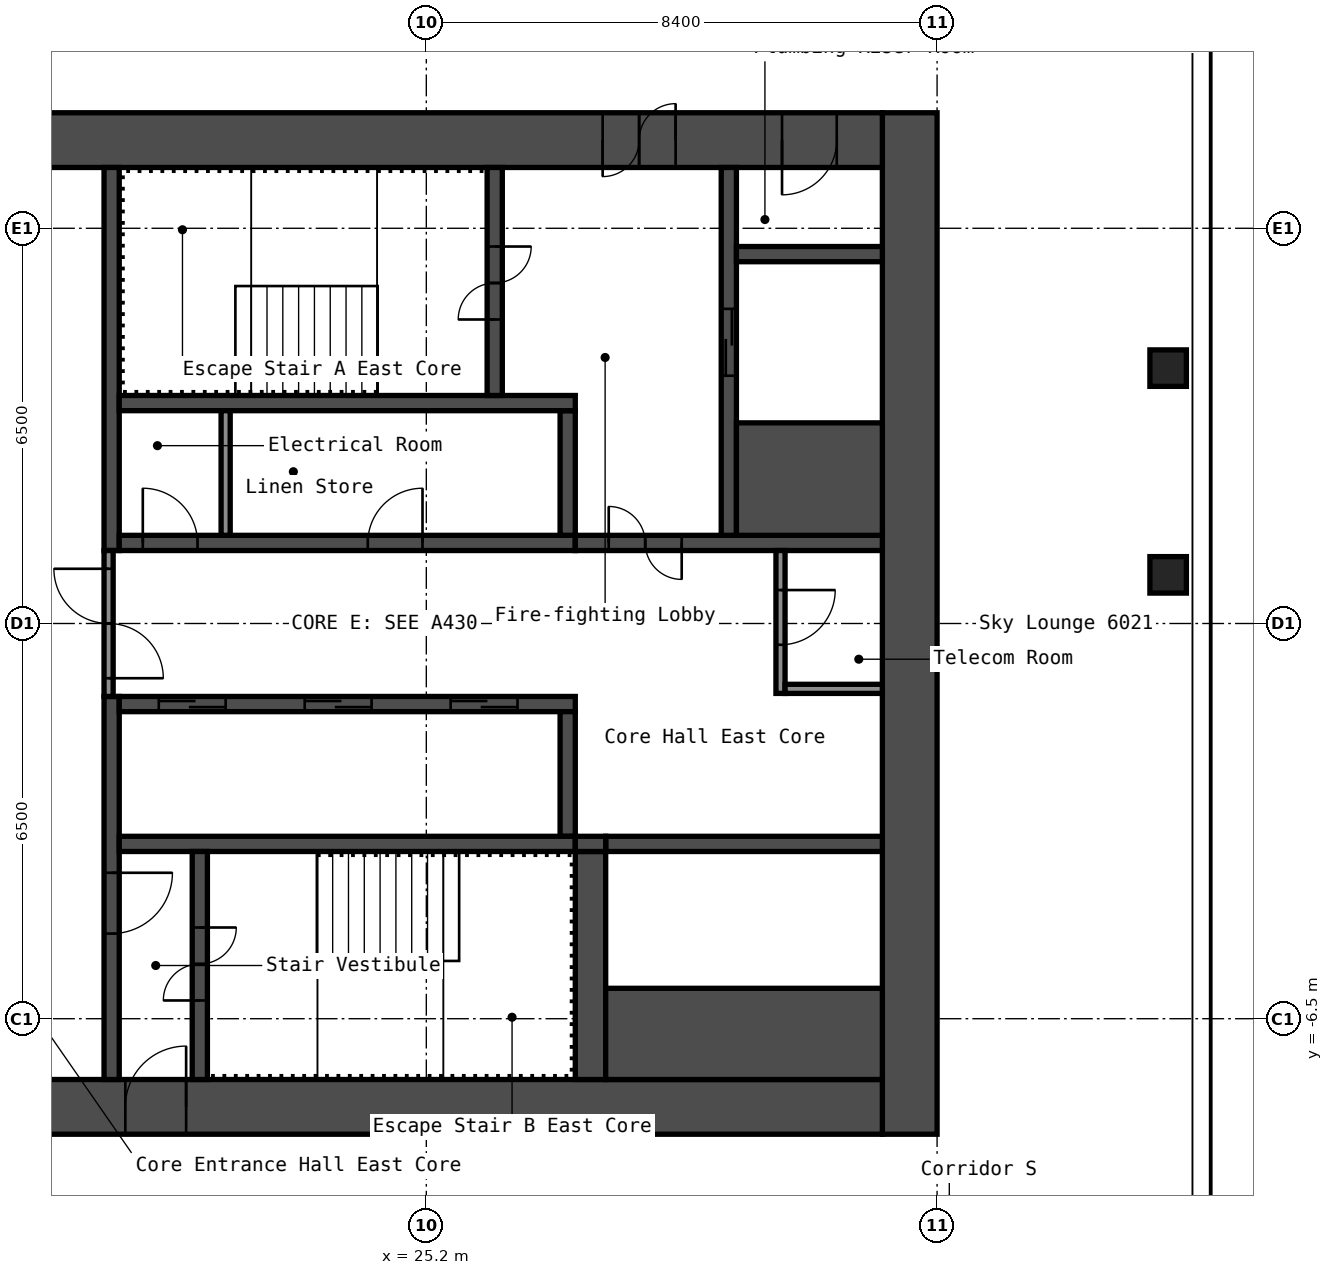
"""IFC4 building model, lengths in metres.
Left out: names, types, materials, properties, quantities, classifications, styles, units other than length and angle.
Written with IfcOpenShell. Run it as: python <this file> out.ifc"""

import sys

from ifc_helpers import new_model, si_unit, direction, frame, frame_2d, origin, origin_2d, place, context, subcontext, project, spatial, rectangle, hollow_rectangle, extrude, element, fill, save


model = new_model("IFC4")
c1 = context("Model", 3, precision=1e-05, world=origin(), true_north=direction((0.0, 1.0)))
c2 = subcontext(c1, "Body", "Model", "MODEL_VIEW")
j1 = project(units=[si_unit("LENGTHUNIT", "METRE"), si_unit("PLANEANGLEUNIT", "RADIAN")], contexts=[c1])
p1 = place(None, origin())
s1 = spatial("IfcSite", under=j1, at=p1, CompositionType="ELEMENT")
p2 = place(p1, origin())
s2 = spatial("IfcBuilding", under=s1, at=p2, CompositionType="ELEMENT")
p3 = place(p2, frame((0.0, 0.0, 212.2)))
s3 = spatial("IfcBuildingStorey", under=s2, at=p3, CompositionType="ELEMENT", Elevation=212.2)
for number, where, z_axis, x_axis in (
    (1, (37.4, 0.8, 0.0), (0.0, 0.0, 1.0), (1.0, 0.0, 0.0)),
    (2, (37.4, 4.2, 0.0), (0.0, 0.0, 1.0), (1.0, 0.0, 0.0)),
):
    element("IfcColumn", number, at=place(p3, frame(where, z_axis=z_axis, x_axis=x_axis)), inside=s3, PredefinedType="COLUMN", context=c2, shape_type="SweptSolid", body=[
        extrude(hollow_rectangle(XDim=0.6, YDim=0.6, WallThickness=0.025, InnerFilletRadius=0.038, OuterFilletRadius=0.062, at=origin_2d()), origin(), (0.0, 0.0, 1.0), 2.75),
    ])
p4 = place(p3, frame((33.15, -8.4, 0.0), z_axis=(0.0, 0.0, 1.0), x_axis=(0.0, 1.0, 0.0)))
e3 = element("IfcWall", 3, at=p4, inside=s3, PredefinedType="SHEAR", context=c2, shape_type="SweptSolid", body=[
    extrude(rectangle(XDim=16.8, YDim=0.9, at=frame_2d((8.4, 0.0))), origin(), (0.0, 0.0, 1.0), 2.75),
])
p5 = place(p3, frame((17.7, 7.95, 0.0), z_axis=(0.0, 0.0, 1.0), x_axis=(1.0, 0.0, 0.0)))
e4 = element("IfcWall", 4, at=p5, inside=s3, PredefinedType="SHEAR", context=c2, shape_type="SweptSolid", body=[
    extrude(rectangle(XDim=15.0, YDim=0.9, at=frame_2d((7.5, 0.0))), origin(), (0.0, 0.0, 1.0), 2.75),
])
p6 = place(p5, frame((10.4, 0.0, 0.0)))
e5 = element("IfcOpeningElement", 5, at=p6, cuts=e4, PredefinedType="OPENING", context=c2, shape_type="SweptSolid", body=[
    extrude(rectangle(XDim=1.2, YDim=2.1, at=frame_2d((0.6, 1.05))), frame((0.0, 0.46, 0.0), z_axis=(0.0, -1.0, 0.0), x_axis=(1.0, 0.0, 0.0)), (0.0, 0.0, 1.0), 0.92),
])
p7 = place(p5, frame((13.35, 0.0, 0.0)))
e6 = element("IfcOpeningElement", 6, at=p7, cuts=e4, PredefinedType="OPENING", context=c2, shape_type="SweptSolid", body=[
    extrude(rectangle(XDim=0.9, YDim=2.1, at=frame_2d((0.45, 1.05))), frame((0.0, 0.46, 0.0), z_axis=(0.0, -1.0, 0.0), x_axis=(1.0, 0.0, 0.0)), (0.0, 0.0, 1.0), 0.92),
])
p8 = place(p3, frame((17.7, -7.95, 0.0), z_axis=(0.0, 0.0, 1.0), x_axis=(1.0, 0.0, 0.0)))
e7 = element("IfcWall", 7, at=p8, inside=s3, PredefinedType="SHEAR", context=c2, shape_type="SweptSolid", body=[
    extrude(rectangle(XDim=15.0, YDim=0.9, at=frame_2d((7.5, 0.0))), origin(), (0.0, 0.0, 1.0), 2.75),
])
p9 = place(p8, frame((2.55, 0.0, 0.0)))
e8 = element("IfcOpeningElement", 8, at=p9, cuts=e7, PredefinedType="OPENING", context=c2, shape_type="SweptSolid", body=[
    extrude(rectangle(XDim=1.0, YDim=2.1, at=frame_2d((0.5, 1.05))), frame((0.0, 0.46, 0.0), z_axis=(0.0, -1.0, 0.0), x_axis=(1.0, 0.0, 0.0)), (0.0, 0.0, 1.0), 0.92),
])
p10 = place(p3, frame((20.025, 1.2, 0.0), z_axis=(0.0, 0.0, 1.0), x_axis=(0.0, 1.0, 0.0)))
e9 = element("IfcWall", 9, at=p10, inside=s3, PredefinedType="SHEAR", context=c2, shape_type="SweptSolid", body=[
    extrude(rectangle(XDim=6.3, YDim=0.25, at=frame_2d((3.15, 0.0))), origin(), (0.0, 0.0, 1.0), 2.75),
])
p11 = place(p3, frame((20.025, -7.5, 0.0), z_axis=(0.0, 0.0, 1.0), x_axis=(0.0, 1.0, 0.0)))
e10 = element("IfcWall", 10, at=p11, inside=s3, PredefinedType="SHEAR", context=c2, shape_type="SweptSolid", body=[
    extrude(rectangle(XDim=6.3, YDim=0.25, at=frame_2d((3.15, 0.0))), origin(), (0.0, 0.0, 1.0), 2.75),
])
p12 = place(p11, frame((2.4, 0.0, 0.0)))
e11 = element("IfcOpeningElement", 11, at=p12, cuts=e10, PredefinedType="OPENING", context=c2, shape_type="SweptSolid", body=[
    extrude(rectangle(XDim=1.0, YDim=2.1, at=frame_2d((0.5, 1.05))), frame((0.0, 0.135, 0.0), z_axis=(0.0, -1.0, 0.0), x_axis=(1.0, 0.0, 0.0)), (0.0, 0.0, 1.0), 0.27),
])
p13 = place(p3, frame((20.15, 1.325, 0.0), z_axis=(0.0, 0.0, 1.0), x_axis=(1.0, 0.0, 0.0)))
e12 = element("IfcWall", 12, at=p13, inside=s3, PredefinedType="SHEAR", context=c2, shape_type="SweptSolid", body=[
    extrude(rectangle(XDim=7.5, YDim=0.25, at=frame_2d((3.75, 0.0))), origin(), (0.0, 0.0, 1.0), 2.75),
])
p14 = place(p13, frame((0.387, 0.0, 0.0)))
e13 = element("IfcOpeningElement", 13, at=p14, cuts=e12, PredefinedType="OPENING", context=c2, shape_type="SweptSolid", body=[
    extrude(rectangle(XDim=0.9, YDim=2.1, at=frame_2d((0.45, 1.05))), frame((0.0, 0.135, 0.0), z_axis=(0.0, -1.0, 0.0), x_axis=(1.0, 0.0, 0.0)), (0.0, 0.0, 1.0), 0.27),
])
p15 = place(p13, frame((4.087, 0.0, 0.0)))
e14 = element("IfcOpeningElement", 14, at=p15, cuts=e12, PredefinedType="OPENING", context=c2, shape_type="SweptSolid", body=[
    extrude(rectangle(XDim=0.9, YDim=2.1, at=frame_2d((0.45, 1.05))), frame((0.0, 0.135, 0.0), z_axis=(0.0, -1.0, 0.0), x_axis=(1.0, 0.0, 0.0)), (0.0, 0.0, 1.0), 0.27),
])
p16 = place(p3, frame((27.525, 1.45, 0.0), z_axis=(0.0, 0.0, 1.0), x_axis=(0.0, 1.0, 0.0)))
e15 = element("IfcWall", 15, at=p16, inside=s3, PredefinedType="SHEAR", context=c2, shape_type="SweptSolid", body=[
    extrude(rectangle(XDim=2.05, YDim=0.25, at=frame_2d((1.025, 0.0))), origin(), (0.0, 0.0, 1.0), 2.75),
])
p17 = place(p3, frame((20.15, 3.625, 0.0), z_axis=(0.0, 0.0, 1.0), x_axis=(1.0, 0.0, 0.0)))
e16 = element("IfcWall", 16, at=p17, inside=s3, PredefinedType="SHEAR", context=c2, shape_type="SweptSolid", body=[
    extrude(rectangle(XDim=7.5, YDim=0.25, at=frame_2d((3.75, 0.0))), origin(), (0.0, 0.0, 1.0), 2.75),
])
p18 = place(p3, frame((26.325, 3.75, 0.0), z_axis=(0.0, 0.0, 1.0), x_axis=(0.0, 1.0, 0.0)))
e17 = element("IfcWall", 17, at=p18, inside=s3, PredefinedType="SHEAR", context=c2, shape_type="SweptSolid", body=[
    extrude(rectangle(XDim=3.75, YDim=0.25, at=frame_2d((1.875, 0.0))), origin(), (0.0, 0.0, 1.0), 2.75),
])
p19 = place(p18, frame((1.25, 0.0, 0.0)))
e18 = element("IfcOpeningElement", 18, at=p19, cuts=e17, PredefinedType="OPENING", context=c2, shape_type="SweptSolid", body=[
    extrude(rectangle(XDim=1.2, YDim=2.1, at=frame_2d((0.6, 1.05))), frame((0.0, 0.135, 0.0), z_axis=(0.0, -1.0, 0.0), x_axis=(1.0, 0.0, 0.0)), (0.0, 0.0, 1.0), 0.27),
])
p20 = place(p3, frame((27.65, 1.325, 0.0), z_axis=(0.0, 0.0, 1.0), x_axis=(1.0, 0.0, 0.0)))
e19 = element("IfcWall", 19, at=p20, inside=s3, PredefinedType="SHEAR", context=c2, shape_type="SweptSolid", body=[
    extrude(rectangle(XDim=5.05, YDim=0.25, at=frame_2d((2.525, 0.0))), origin(), (0.0, 0.0, 1.0), 2.75),
])
p21 = place(p20, frame((0.55, 0.0, 0.0)))
e20 = element("IfcOpeningElement", 20, at=p21, cuts=e19, PredefinedType="OPENING", context=c2, shape_type="SweptSolid", body=[
    extrude(rectangle(XDim=1.2, YDim=2.1, at=frame_2d((0.6, 1.05))), frame((0.0, 0.135, 0.0), z_axis=(0.0, -1.0, 0.0), x_axis=(1.0, 0.0, 0.0)), (0.0, 0.0, 1.0), 0.27),
])
p22 = place(p3, frame((30.175, 1.45, 0.0), z_axis=(0.0, 0.0, 1.0), x_axis=(0.0, 1.0, 0.0)))
e21 = element("IfcWall", 21, at=p22, inside=s3, PredefinedType="SHEAR", context=c2, shape_type="SweptSolid", body=[
    extrude(rectangle(XDim=6.05, YDim=0.25, at=frame_2d((3.025, 0.0))), origin(), (0.0, 0.0, 1.0), 2.75),
])
p23 = place(p22, frame((2.625, 0.0, 0.0)))
e22 = element("IfcOpeningElement", 22, at=p23, cuts=e21, PredefinedType="OPENING", context=c2, shape_type="SweptSolid", body=[
    extrude(rectangle(XDim=1.1, YDim=2.1, at=frame_2d((0.55, 1.05))), frame((0.0, 0.135, 0.0), z_axis=(0.0, -1.0, 0.0), x_axis=(1.0, 0.0, 0.0)), (0.0, 0.0, 1.0), 0.27),
])
p24 = place(p3, frame((30.3, 2.375, 0.0), z_axis=(0.0, 0.0, 1.0), x_axis=(1.0, 0.0, 0.0)))
e23 = element("IfcWall", 23, at=p24, inside=s3, PredefinedType="SHEAR", context=c2, shape_type="SweptSolid", body=[
    extrude(rectangle(XDim=2.4, YDim=1.85, at=frame_2d((1.2, 0.0))), origin(), (0.0, 0.0, 1.0), 2.75),
])
p25 = place(p3, frame((30.3, 6.075, 0.0), z_axis=(0.0, 0.0, 1.0), x_axis=(1.0, 0.0, 0.0)))
e24 = element("IfcWall", 24, at=p25, inside=s3, PredefinedType="SHEAR", context=c2, shape_type="SweptSolid", body=[
    extrude(rectangle(XDim=2.4, YDim=0.25, at=frame_2d((1.2, 0.0))), origin(), (0.0, 0.0, 1.0), 2.75),
])
p26 = place(p3, frame((20.15, -1.325, 0.0), z_axis=(0.0, 0.0, 1.0), x_axis=(1.0, 0.0, 0.0)))
e25 = element("IfcWall", 25, at=p26, inside=s3, PredefinedType="SHEAR", context=c2, shape_type="SweptSolid", body=[
    extrude(rectangle(XDim=7.5, YDim=0.25, at=frame_2d((3.75, 0.0))), origin(), (0.0, 0.0, 1.0), 2.75),
])
p27 = place(p26, frame((0.65, 0.0, 0.0)))
e26 = element("IfcOpeningElement", 26, at=p27, cuts=e25, PredefinedType="OPENING", context=c2, shape_type="SweptSolid", body=[
    extrude(rectangle(XDim=1.1, YDim=2.1, at=frame_2d((0.55, 1.05))), frame((0.0, 0.135, 0.0), z_axis=(0.0, -1.0, 0.0), x_axis=(1.0, 0.0, 0.0)), (0.0, 0.0, 1.0), 0.27),
])
p28 = place(p26, frame((3.05, 0.0, 0.0)))
e27 = element("IfcOpeningElement", 27, at=p28, cuts=e25, PredefinedType="OPENING", context=c2, shape_type="SweptSolid", body=[
    extrude(rectangle(XDim=1.1, YDim=2.1, at=frame_2d((0.55, 1.05))), frame((0.0, 0.135, 0.0), z_axis=(0.0, -1.0, 0.0), x_axis=(1.0, 0.0, 0.0)), (0.0, 0.0, 1.0), 0.27),
])
p29 = place(p26, frame((5.45, 0.0, 0.0)))
e28 = element("IfcOpeningElement", 28, at=p29, cuts=e25, PredefinedType="OPENING", context=c2, shape_type="SweptSolid", body=[
    extrude(rectangle(XDim=1.1, YDim=2.1, at=frame_2d((0.55, 1.05))), frame((0.0, 0.135, 0.0), z_axis=(0.0, -1.0, 0.0), x_axis=(1.0, 0.0, 0.0)), (0.0, 0.0, 1.0), 0.27),
])
p30 = place(p3, frame((27.525, -3.5, 0.0), z_axis=(0.0, 0.0, 1.0), x_axis=(0.0, 1.0, 0.0)))
e29 = element("IfcWall", 29, at=p30, inside=s3, PredefinedType="SHEAR", context=c2, shape_type="SweptSolid", body=[
    extrude(rectangle(XDim=2.05, YDim=0.25, at=frame_2d((1.025, 0.0))), origin(), (0.0, 0.0, 1.0), 2.75),
])
p31 = place(p3, frame((20.15, -3.625, 0.0), z_axis=(0.0, 0.0, 1.0), x_axis=(1.0, 0.0, 0.0)))
e30 = element("IfcWall", 30, at=p31, inside=s3, PredefinedType="SHEAR", context=c2, shape_type="SweptSolid", body=[
    extrude(rectangle(XDim=7.5, YDim=0.25, at=frame_2d((3.75, 0.0))), origin(), (0.0, 0.0, 1.0), 2.75),
])
p32 = place(p3, frame((21.475, -7.5, 0.0), z_axis=(0.0, 0.0, 1.0), x_axis=(0.0, 1.0, 0.0)))
e31 = element("IfcWall", 31, at=p32, inside=s3, PredefinedType="SHEAR", context=c2, shape_type="SweptSolid", body=[
    extrude(rectangle(XDim=3.75, YDim=0.25, at=frame_2d((1.875, 0.0))), origin(), (0.0, 0.0, 1.0), 2.75),
])
p33 = place(p32, frame((1.3, 0.0, 0.0)))
e32 = element("IfcOpeningElement", 32, at=p33, cuts=e31, PredefinedType="OPENING", context=c2, shape_type="SweptSolid", body=[
    extrude(rectangle(XDim=1.2, YDim=2.1, at=frame_2d((0.6, 1.05))), frame((0.0, 0.135, 0.0), z_axis=(0.0, -1.0, 0.0), x_axis=(1.0, 0.0, 0.0)), (0.0, 0.0, 1.0), 0.27),
])
p34 = place(p3, frame((27.9, -7.5, 0.0), z_axis=(0.0, 0.0, 1.0), x_axis=(0.0, 1.0, 0.0)))
e33 = element("IfcWall", 33, at=p34, inside=s3, PredefinedType="SHEAR", context=c2, shape_type="SweptSolid", body=[
    extrude(rectangle(XDim=3.75, YDim=0.5, at=frame_2d((1.875, 0.0))), origin(), (0.0, 0.0, 1.0), 2.75),
])
p35 = place(p3, frame((28.15, -3.625, 0.0), z_axis=(0.0, 0.0, 1.0), x_axis=(1.0, 0.0, 0.0)))
e34 = element("IfcWall", 34, at=p35, inside=s3, PredefinedType="SHEAR", context=c2, shape_type="SweptSolid", body=[
    extrude(rectangle(XDim=4.55, YDim=0.25, at=frame_2d((2.275, 0.0))), origin(), (0.0, 0.0, 1.0), 2.75),
])
p36 = place(p3, frame((28.15, -6.75, 0.0), z_axis=(0.0, 0.0, 1.0), x_axis=(1.0, 0.0, 0.0)))
e35 = element("IfcWall", 35, at=p36, inside=s3, PredefinedType="SHEAR", context=c2, shape_type="SweptSolid", body=[
    extrude(rectangle(XDim=4.55, YDim=1.5, at=frame_2d((2.275, 0.0))), origin(), (0.0, 0.0, 1.0), 2.75),
])
p37 = place(p3, frame((27.65, -3.625, 0.0), z_axis=(0.0, 0.0, 1.0), x_axis=(1.0, 0.0, 0.0)))
e36 = element("IfcWall", 36, at=p37, inside=s3, PredefinedType="SHEAR", context=c2, shape_type="SweptSolid", body=[
    extrude(rectangle(XDim=0.5, YDim=0.25, at=frame_2d((0.25, 0.0))), origin(), (0.0, 0.0, 1.0), 2.75),
])
p38 = place(p3, frame((19.975, -1.2, 0.0), z_axis=(0.0, 0.0, 1.0), x_axis=(0.0, 1.0, 0.0)))
e37 = element("IfcWall", 37, at=p38, inside=s3, PredefinedType="PARTITIONING", context=c2, shape_type="SweptSolid", body=[
    extrude(rectangle(XDim=2.4, YDim=0.15, at=frame_2d((1.2, 0.0))), origin(), (0.0, 0.0, 1.0), 2.75),
])
p39 = place(p38, frame((0.3, 0.0, 0.0)))
e38 = element("IfcOpeningElement", 38, at=p39, cuts=e37, PredefinedType="OPENING", context=c2, shape_type="SweptSolid", body=[
    extrude(rectangle(XDim=1.8, YDim=2.1, at=frame_2d((0.9, 1.05))), frame((0.0, 0.085, 0.0), z_axis=(0.0, -1.0, 0.0), x_axis=(1.0, 0.0, 0.0)), (0.0, 0.0, 1.0), 0.17),
])
p40 = place(p3, frame((31.025, -1.15, 0.0), z_axis=(0.0, 0.0, 1.0), x_axis=(0.0, 1.0, 0.0)))
e39 = element("IfcWall", 39, at=p40, inside=s3, PredefinedType="PARTITIONING", context=c2, shape_type="SweptSolid", body=[
    extrude(rectangle(XDim=2.35, YDim=0.15, at=frame_2d((1.175, 0.0))), origin(), (0.0, 0.0, 1.0), 2.75),
])
p41 = place(p40, frame((0.8, 0.0, 0.0)))
e40 = element("IfcOpeningElement", 40, at=p41, cuts=e39, PredefinedType="OPENING", context=c2, shape_type="SweptSolid", body=[
    extrude(rectangle(XDim=0.9, YDim=2.1, at=frame_2d((0.45, 1.05))), frame((0.0, 0.085, 0.0), z_axis=(0.0, -1.0, 0.0), x_axis=(1.0, 0.0, 0.0)), (0.0, 0.0, 1.0), 0.17),
])
p42 = place(p3, frame((31.1, -1.075, 0.0), z_axis=(0.0, 0.0, 1.0), x_axis=(1.0, 0.0, 0.0)))
e41 = element("IfcWall", 41, at=p42, inside=s3, PredefinedType="PARTITIONING", context=c2, shape_type="SweptSolid", body=[
    extrude(rectangle(XDim=1.6, YDim=0.15, at=frame_2d((0.8, 0.0))), origin(), (0.0, 0.0, 1.0), 2.75),
])
p43 = place(p3, frame((21.9, 1.45, 0.0), z_axis=(0.0, 0.0, 1.0), x_axis=(0.0, 1.0, 0.0)))
e42 = element("IfcWall", 42, at=p43, inside=s3, PredefinedType="PARTITIONING", context=c2, shape_type="SweptSolid", body=[
    extrude(rectangle(XDim=2.05, YDim=0.15, at=frame_2d((1.025, 0.0))), origin(), (0.0, 0.0, 1.0), 2.75),
])
p44 = place(p6, origin())
e43 = element("IfcDoor", 43, at=p44, inside=s3, OperationType="DOUBLE_DOOR_SINGLE_SWING", PredefinedType="DOOR", context=c2, shape_type="SweptSolid", body=[
    extrude(rectangle(XDim=1.2, YDim=2.1, at=frame_2d((0.6, 1.05))), frame((0.0, 0.025, 0.0), z_axis=(0.0, -1.0, 0.0), x_axis=(1.0, 0.0, 0.0)), (0.0, 0.0, 1.0), 0.05),
])
fill(e5, e43)
p45 = place(p7, origin())
e44 = element("IfcDoor", 44, at=p45, inside=s3, OperationType="SINGLE_SWING_LEFT", PredefinedType="DOOR", context=c2, shape_type="SweptSolid", body=[
    extrude(rectangle(XDim=0.9, YDim=2.1, at=frame_2d((0.45, 1.05))), frame((0.0, 0.025, 0.0), z_axis=(0.0, -1.0, 0.0), x_axis=(1.0, 0.0, 0.0)), (0.0, 0.0, 1.0), 0.05),
])
fill(e6, e44)
p46 = place(p9, origin())
e45 = element("IfcDoor", 45, at=p46, inside=s3, OperationType="SINGLE_SWING_LEFT", PredefinedType="DOOR", context=c2, shape_type="SweptSolid", body=[
    extrude(rectangle(XDim=1.0, YDim=2.1, at=frame_2d((0.5, 1.05))), frame((0.0, 0.025, 0.0), z_axis=(0.0, -1.0, 0.0), x_axis=(1.0, 0.0, 0.0)), (0.0, 0.0, 1.0), 0.05),
])
fill(e8, e45)
p47 = place(p19, origin())
e46 = element("IfcDoor", 46, at=p47, inside=s3, OperationType="DOUBLE_DOOR_SINGLE_SWING", PredefinedType="DOOR", context=c2, shape_type="SweptSolid", body=[
    extrude(rectangle(XDim=1.2, YDim=2.1, at=frame_2d((0.6, 1.05))), frame((0.0, 0.025, 0.0), z_axis=(0.0, -1.0, 0.0), x_axis=(1.0, 0.0, 0.0)), (0.0, 0.0, 1.0), 0.05),
])
fill(e18, e46)
p48 = place(p33, origin())
e47 = element("IfcDoor", 47, at=p48, inside=s3, OperationType="DOUBLE_DOOR_SINGLE_SWING", PredefinedType="DOOR", context=c2, shape_type="SweptSolid", body=[
    extrude(rectangle(XDim=1.2, YDim=2.1, at=frame_2d((0.6, 1.05))), frame((0.0, 0.025, 0.0), z_axis=(0.0, -1.0, 0.0), x_axis=(1.0, 0.0, 0.0)), (0.0, 0.0, 1.0), 0.05),
])
fill(e32, e47)
p49 = place(p12, origin())
e48 = element("IfcDoor", 48, at=p49, inside=s3, OperationType="SINGLE_SWING_RIGHT", PredefinedType="DOOR", context=c2, shape_type="SweptSolid", body=[
    extrude(rectangle(XDim=1.0, YDim=2.1, at=frame_2d((0.5, 1.05))), frame((0.0, 0.025, 0.0), z_axis=(0.0, -1.0, 0.0), x_axis=(1.0, 0.0, 0.0)), (0.0, 0.0, 1.0), 0.05),
])
fill(e11, e48)
p50 = place(p21, origin())
e49 = element("IfcDoor", 49, at=p50, inside=s3, OperationType="DOUBLE_DOOR_SINGLE_SWING", PredefinedType="DOOR", context=c2, shape_type="SweptSolid", body=[
    extrude(rectangle(XDim=1.2, YDim=2.1, at=frame_2d((0.6, 1.05))), frame((0.0, 0.025, 0.0), z_axis=(0.0, -1.0, 0.0), x_axis=(1.0, 0.0, 0.0)), (0.0, 0.0, 1.0), 0.05),
])
fill(e20, e49)
p51 = place(p39, origin())
e50 = element("IfcDoor", 50, at=p51, inside=s3, OperationType="DOUBLE_DOOR_SINGLE_SWING", PredefinedType="DOOR", context=c2, shape_type="SweptSolid", body=[
    extrude(rectangle(XDim=1.8, YDim=2.1, at=frame_2d((0.9, 1.05))), frame((0.0, 0.025, 0.0), z_axis=(0.0, -1.0, 0.0), x_axis=(1.0, 0.0, 0.0)), (0.0, 0.0, 1.0), 0.05),
])
fill(e38, e50)
p52 = place(p41, origin())
e51 = element("IfcDoor", 51, at=p52, inside=s3, OperationType="SINGLE_SWING_RIGHT", PredefinedType="DOOR", context=c2, shape_type="SweptSolid", body=[
    extrude(rectangle(XDim=0.9, YDim=2.1, at=frame_2d((0.45, 1.05))), frame((0.0, 0.025, 0.0), z_axis=(0.0, -1.0, 0.0), x_axis=(1.0, 0.0, 0.0)), (0.0, 0.0, 1.0), 0.05),
])
fill(e40, e51)
p53 = place(p14, origin())
e52 = element("IfcDoor", 52, at=p53, inside=s3, OperationType="SINGLE_SWING_RIGHT", PredefinedType="DOOR", context=c2, shape_type="SweptSolid", body=[
    extrude(rectangle(XDim=0.9, YDim=2.1, at=frame_2d((0.45, 1.05))), frame((0.0, 0.025, 0.0), z_axis=(0.0, -1.0, 0.0), x_axis=(1.0, 0.0, 0.0)), (0.0, 0.0, 1.0), 0.05),
])
fill(e13, e52)
p54 = place(p15, origin())
e53 = element("IfcDoor", 53, at=p54, inside=s3, OperationType="SINGLE_SWING_LEFT", PredefinedType="DOOR", context=c2, shape_type="SweptSolid", body=[
    extrude(rectangle(XDim=0.9, YDim=2.1, at=frame_2d((0.45, 1.05))), frame((0.0, 0.025, 0.0), z_axis=(0.0, -1.0, 0.0), x_axis=(1.0, 0.0, 0.0)), (0.0, 0.0, 1.0), 0.05),
])
fill(e14, e53)
p55 = place(p27, origin())
e54 = element("IfcDoor", 54, at=p55, inside=s3, OperationType="DOUBLE_DOOR_SLIDING", PredefinedType="DOOR", context=c2, shape_type="SweptSolid", body=[
    extrude(rectangle(XDim=1.1, YDim=2.1, at=frame_2d((0.55, 1.05))), frame((0.0, 0.025, 0.0), z_axis=(0.0, -1.0, 0.0), x_axis=(1.0, 0.0, 0.0)), (0.0, 0.0, 1.0), 0.05),
])
fill(e26, e54)
p56 = place(p28, origin())
e55 = element("IfcDoor", 55, at=p56, inside=s3, OperationType="DOUBLE_DOOR_SLIDING", PredefinedType="DOOR", context=c2, shape_type="SweptSolid", body=[
    extrude(rectangle(XDim=1.1, YDim=2.1, at=frame_2d((0.55, 1.05))), frame((0.0, 0.025, 0.0), z_axis=(0.0, -1.0, 0.0), x_axis=(1.0, 0.0, 0.0)), (0.0, 0.0, 1.0), 0.05),
])
fill(e27, e55)
p57 = place(p29, origin())
e56 = element("IfcDoor", 56, at=p57, inside=s3, OperationType="DOUBLE_DOOR_SLIDING", PredefinedType="DOOR", context=c2, shape_type="SweptSolid", body=[
    extrude(rectangle(XDim=1.1, YDim=2.1, at=frame_2d((0.55, 1.05))), frame((0.0, 0.025, 0.0), z_axis=(0.0, -1.0, 0.0), x_axis=(1.0, 0.0, 0.0)), (0.0, 0.0, 1.0), 0.05),
])
fill(e28, e56)
p58 = place(p23, origin())
e57 = element("IfcDoor", 57, at=p58, inside=s3, OperationType="DOUBLE_DOOR_SLIDING", PredefinedType="DOOR", context=c2, shape_type="SweptSolid", body=[
    extrude(rectangle(XDim=1.1, YDim=2.1, at=frame_2d((0.55, 1.05))), frame((0.0, 0.025, 0.0), z_axis=(0.0, -1.0, 0.0), x_axis=(1.0, 0.0, 0.0)), (0.0, 0.0, 1.0), 0.05),
])
fill(e22, e57)
save(model, sys.argv[1])
